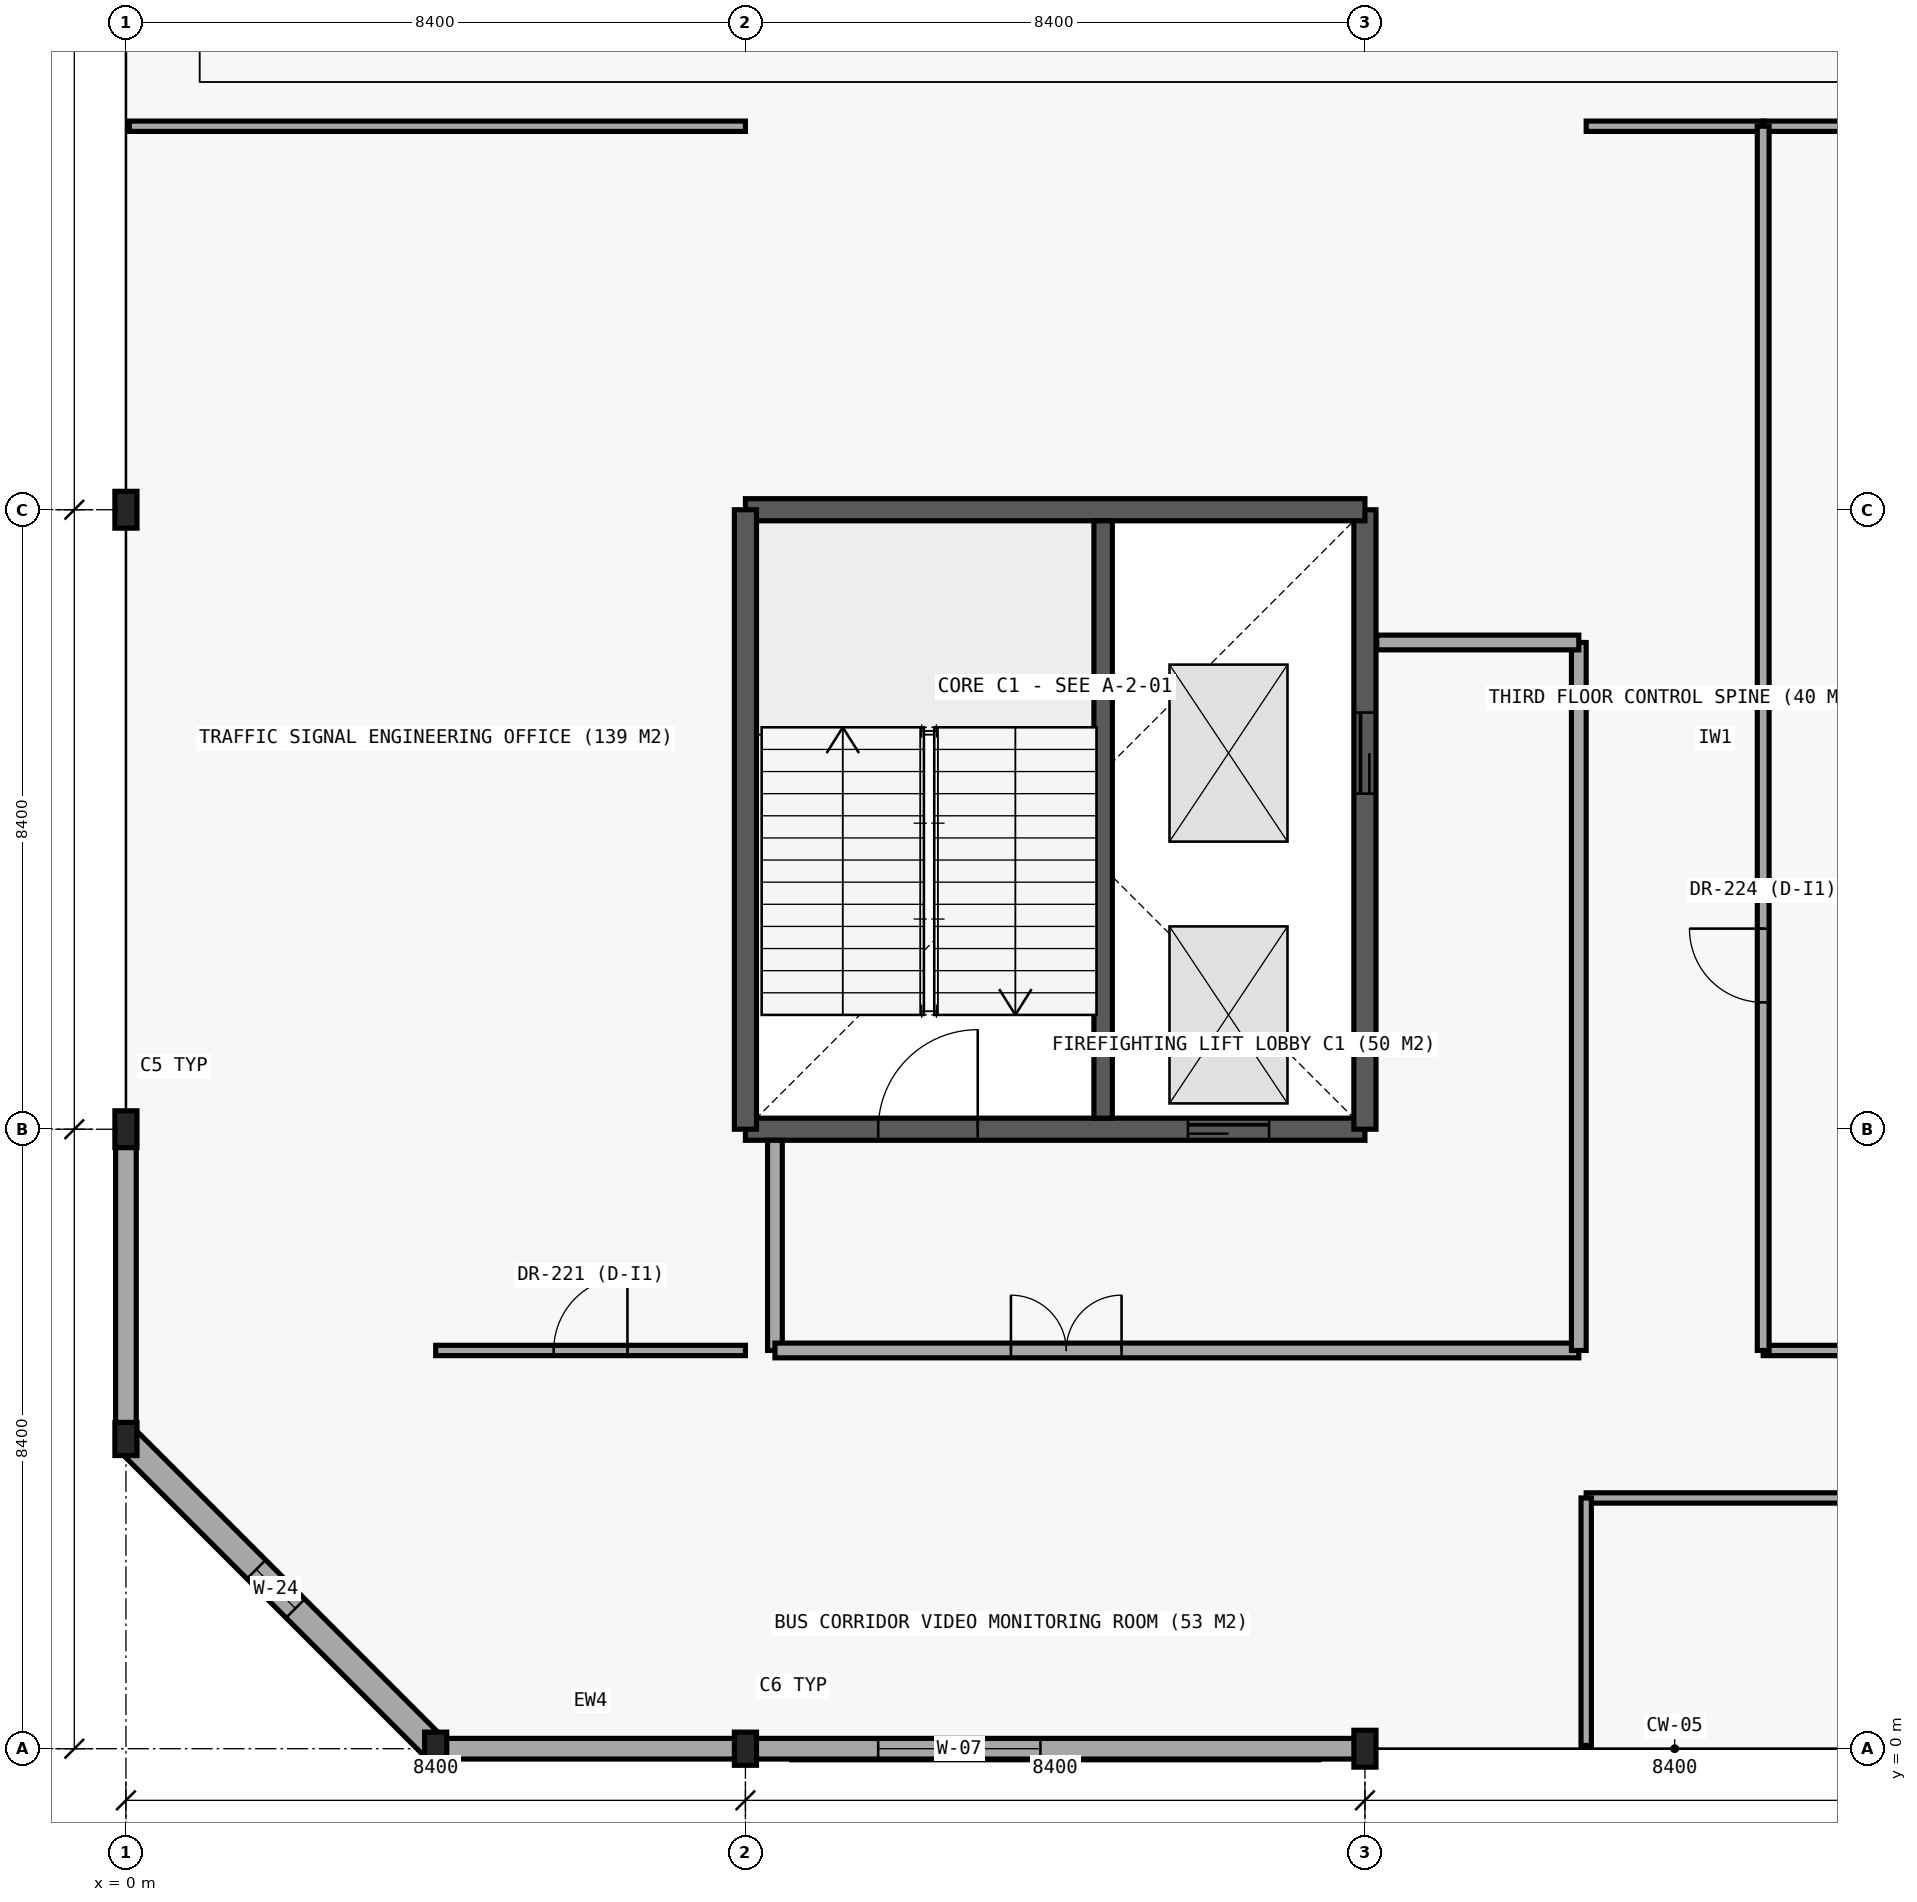
"""IFC4 building model, lengths in metres.
Left out: names, types, materials, properties, quantities, classifications, styles, units other than length and angle.
Written with IfcOpenShell. Run it as: python <this file> out.ifc"""

import sys

from ifc_helpers import new_model, si_unit, direction, frame, frame_2d, origin, origin_2d, place, context, subcontext, project, spatial, rectangle, i_section, extrude, element, fill, save


model = new_model("IFC4")
c1 = context("Model", 3, precision=1e-05, world=origin(), true_north=direction((0.0, 1.0)))
c2 = subcontext(c1, "Body", "Model", "MODEL_VIEW")
j1 = project(units=[si_unit("LENGTHUNIT", "METRE"), si_unit("PLANEANGLEUNIT", "RADIAN")], contexts=[c1])
p1 = place(None, origin())
s1 = spatial("IfcSite", under=j1, at=p1, CompositionType="ELEMENT")
p2 = place(p1, origin())
s2 = spatial("IfcBuilding", under=s1, at=p2, CompositionType="ELEMENT")
p3 = place(p2, frame((0.0, 0.0, 13.2)))
s3 = spatial("IfcBuildingStorey", under=s2, at=p3, CompositionType="ELEMENT", Elevation=13.2)
p4 = place(p3, frame((8.4, 8.4, 0.0), z_axis=(0.0, 0.0, 1.0), x_axis=(1.0, 0.0, 0.0)))
e1 = element("IfcWall", 1, at=p4, inside=s3, PredefinedType="SHEAR", context=c2, shape_type="SweptSolid", body=[
    extrude(rectangle(XDim=8.4, YDim=0.3, at=frame_2d((4.2, 0.0))), origin(), (0.0, 0.0, 1.0), 4.2),
])
p5 = place(p4, frame((1.8, 0.0, 0.0)))
e2 = element("IfcOpeningElement", 2, at=p5, cuts=e1, PredefinedType="OPENING", context=c2, shape_type="SweptSolid", body=[
    extrude(rectangle(XDim=1.35, YDim=2.2, at=frame_2d((0.675, 1.1))), frame((0.0, 0.16, 0.0), z_axis=(0.0, -1.0, 0.0), x_axis=(1.0, 0.0, 0.0)), (0.0, 0.0, 1.0), 0.32),
])
p6 = place(p4, frame((6.0, 0.0, 0.0)))
e3 = element("IfcOpeningElement", 3, at=p6, cuts=e1, PredefinedType="OPENING", context=c2, shape_type="SweptSolid", body=[
    extrude(rectangle(XDim=1.1, YDim=2.2, at=frame_2d((0.55, 1.1))), frame((0.0, 0.16, 0.0), z_axis=(0.0, -1.0, 0.0), x_axis=(1.0, 0.0, 0.0)), (0.0, 0.0, 1.0), 0.32),
])
p7 = place(p3, frame((16.8, 8.4, 0.0), z_axis=(0.0, 0.0, 1.0), x_axis=(0.0, 1.0, 0.0)))
e4 = element("IfcWall", 4, at=p7, inside=s3, PredefinedType="SHEAR", context=c2, shape_type="SweptSolid", body=[
    extrude(rectangle(XDim=8.4, YDim=0.3, at=frame_2d((4.2, 0.0))), origin(), (0.0, 0.0, 1.0), 4.2),
])
p8 = place(p7, frame((4.55, 0.0, 0.0)))
e5 = element("IfcOpeningElement", 5, at=p8, cuts=e4, PredefinedType="OPENING", context=c2, shape_type="SweptSolid", body=[
    extrude(rectangle(XDim=1.1, YDim=2.2, at=frame_2d((0.55, 1.1))), frame((0.0, 0.16, 0.0), z_axis=(0.0, -1.0, 0.0), x_axis=(1.0, 0.0, 0.0)), (0.0, 0.0, 1.0), 0.32),
])
for number, where, z_axis, x_axis in (
    (6, (16.8, 16.8, 0.0), (0.0, 0.0, 1.0), (-1.0, 0.0, 0.0)),
    (7, (8.4, 16.8, 0.0), (0.0, 0.0, 1.0), (0.0, -1.0, 0.0)),
):
    element("IfcWall", number, at=place(p3, frame(where, z_axis=z_axis, x_axis=x_axis)), inside=s3, PredefinedType="SHEAR", context=c2, shape_type="SweptSolid", body=[
        extrude(rectangle(XDim=8.4, YDim=0.3, at=frame_2d((4.2, 0.0))), origin(), (0.0, 0.0, 1.0), 4.2),
    ])
p9 = place(p3, frame((13.25, 8.55, 0.0), z_axis=(0.0, 0.0, 1.0), x_axis=(0.0, 1.0, 0.0)))
e8 = element("IfcWall", 8, at=p9, inside=s3, PredefinedType="SHEAR", context=c2, shape_type="SweptSolid", body=[
    extrude(rectangle(XDim=8.1, YDim=0.25, at=frame_2d((4.05, 0.0))), origin(), (0.0, 0.0, 1.0), 4.2),
])
for number, where, z_axis, x_axis in (
    (9, (0.0, 8.4, 0.0), (0.0, 0.0, 1.0), (1.0, 0.0, 0.0)),
    (10, (0.0, 16.8, 0.0), (0.0, 0.0, 1.0), (1.0, 0.0, 0.0)),
):
    element("IfcColumn", number, at=place(p3, frame(where, z_axis=z_axis, x_axis=x_axis)), inside=s3, PredefinedType="COLUMN", context=c2, shape_type="SweptSolid", body=[
        extrude(i_section(OverallWidth=0.3, OverallDepth=0.5, WebThickness=0.014, FlangeThickness=0.028, FilletRadius=0.027, at=origin_2d()), origin(), (0.0, 0.0, 1.0), 4.2),
    ])
p10 = place(p3, frame((8.4, 0.0, 0.0), z_axis=(0.0, 0.0, 1.0), x_axis=(1.0, 0.0, 0.0)))
e11 = element("IfcColumn", 11, at=p10, inside=s3, PredefinedType="COLUMN", context=c2, shape_type="SweptSolid", body=[
    extrude(i_section(OverallWidth=0.3, OverallDepth=0.45, WebThickness=0.014, FlangeThickness=0.026, FilletRadius=0.027, at=origin_2d()), origin(), (0.0, 0.0, 1.0), 4.2),
])
p11 = place(p3, frame((16.8, 0.0, 0.0), z_axis=(0.0, 0.0, 1.0), x_axis=(1.0, 0.0, 0.0)))
e12 = element("IfcColumn", 12, at=p11, inside=s3, PredefinedType="COLUMN", context=c2, shape_type="SweptSolid", body=[
    extrude(i_section(OverallWidth=0.3, OverallDepth=0.5, WebThickness=0.014, FlangeThickness=0.028, FilletRadius=0.027, at=origin_2d()), origin(), (0.0, 0.0, 1.0), 4.2),
])
for number, where, z_axis, x_axis in (
    (13, (4.2, 0.0, 0.0), (0.0, 0.0, 1.0), (1.0, 0.0, 0.0)),
    (14, (0.0, 4.2, 0.0), (0.0, 0.0, 1.0), (1.0, 0.0, 0.0)),
):
    element("IfcColumn", number, at=place(p3, frame(where, z_axis=z_axis, x_axis=x_axis)), inside=s3, PredefinedType="COLUMN", context=c2, shape_type="SweptSolid", body=[
        extrude(i_section(OverallWidth=0.3, OverallDepth=0.45, WebThickness=0.014, FlangeThickness=0.026, FilletRadius=0.027, at=origin_2d()), origin(), (0.0, 0.0, 1.0), 4.2),
    ])
p12 = place(p3, frame((4.2, 0.0, 0.0), z_axis=(0.0, 0.0, 1.0), x_axis=(1.0, 0.0, 0.0)))
e15 = element("IfcWall", 15, at=p12, inside=s3, PredefinedType="STANDARD", context=c2, shape_type="SweptSolid", body=[
    extrude(rectangle(XDim=4.2, YDim=0.28, at=frame_2d((2.1, 0.0))), origin(), (0.0, 0.0, 1.0), 3.62),
])
p13 = place(p3, frame((8.4, 0.0, 0.0), z_axis=(0.0, 0.0, 1.0), x_axis=(1.0, 0.0, 0.0)))
e16 = element("IfcWall", 16, at=p13, inside=s3, PredefinedType="STANDARD", context=c2, shape_type="SweptSolid", body=[
    extrude(rectangle(XDim=8.4, YDim=0.28, at=frame_2d((4.2, 0.0))), origin(), (0.0, 0.0, 1.0), 3.62),
])
p14 = place(p13, frame((1.8, 0.0, 0.85)))
e17 = element("IfcOpeningElement", 17, at=p14, cuts=e16, PredefinedType="OPENING", context=c2, shape_type="SweptSolid", body=[
    extrude(rectangle(XDim=2.2, YDim=2.5, at=frame_2d((1.1, 1.25))), frame((0.0, 0.15, 0.0), z_axis=(0.0, -1.0, 0.0), x_axis=(1.0, 0.0, 0.0)), (0.0, 0.0, 1.0), 0.3),
])
p15 = place(p3, frame((0.0, 8.4, 0.0), z_axis=(0.0, 0.0, 1.0), x_axis=(0.0, -1.0, 0.0)))
e18 = element("IfcWall", 18, at=p15, inside=s3, PredefinedType="STANDARD", context=c2, shape_type="SweptSolid", body=[
    extrude(rectangle(XDim=4.2, YDim=0.28, at=frame_2d((2.1, 0.0))), origin(), (0.0, 0.0, 1.0), 3.62),
])
p16 = place(p3, frame((0.0, 4.2, 0.0), z_axis=(0.0, 0.0, 1.0), x_axis=(0.707106781187, -0.707106781187, 0.0)))
e19 = element("IfcWall", 19, at=p16, inside=s3, PredefinedType="STANDARD", context=c2, shape_type="SweptSolid", body=[
    extrude(rectangle(XDim=5.94, YDim=0.36, at=frame_2d((2.97, 0.0))), origin(), (0.0, 0.0, 1.0), 3.62),
])
p17 = place(p16, frame((2.5, 0.0, 1.0)))
e20 = element("IfcOpeningElement", 20, at=p17, cuts=e19, PredefinedType="OPENING", context=c2, shape_type="SweptSolid", body=[
    extrude(rectangle(XDim=0.75, YDim=1.5, at=frame_2d((0.375, 0.75))), frame((0.0, 0.19, 0.0), z_axis=(0.0, -1.0, 0.0), x_axis=(1.0, 0.0, 0.0)), (0.0, 0.0, 1.0), 0.38),
])
p18 = place(p3, frame((8.8, 5.4, 0.0), z_axis=(0.0, 0.0, 1.0), x_axis=(0.0, 1.0, 0.0)))
e21 = element("IfcWall", 21, at=p18, inside=s3, PredefinedType="PARTITIONING", context=c2, shape_type="SweptSolid", body=[
    extrude(rectangle(XDim=2.85, YDim=0.2, at=frame_2d((1.425, 0.0))), origin(), (0.0, 0.0, 1.0), 3.52),
])
p19 = place(p3, frame((8.8, 5.4, 0.0), z_axis=(0.0, 0.0, 1.0), x_axis=(1.0, 0.0, 0.0)))
e22 = element("IfcWall", 22, at=p19, inside=s3, PredefinedType="PARTITIONING", context=c2, shape_type="SweptSolid", body=[
    extrude(rectangle(XDim=10.9, YDim=0.2, at=frame_2d((5.45, 0.0))), origin(), (0.0, 0.0, 1.0), 3.52),
])
p20 = place(p19, frame((3.2, 0.0, 0.0)))
e23 = element("IfcOpeningElement", 23, at=p20, cuts=e22, PredefinedType="OPENING", context=c2, shape_type="SweptSolid", body=[
    extrude(rectangle(XDim=1.5, YDim=2.2, at=frame_2d((0.75, 1.1))), frame((0.0, 0.11, 0.0), z_axis=(0.0, -1.0, 0.0), x_axis=(1.0, 0.0, 0.0)), (0.0, 0.0, 1.0), 0.22),
])
p21 = place(p3, frame((19.7, 5.4, 0.0), z_axis=(0.0, 0.0, 1.0), x_axis=(0.0, 1.0, 0.0)))
e24 = element("IfcWall", 24, at=p21, inside=s3, PredefinedType="PARTITIONING", context=c2, shape_type="SweptSolid", body=[
    extrude(rectangle(XDim=9.6, YDim=0.2, at=frame_2d((4.8, 0.0))), origin(), (0.0, 0.0, 1.0), 3.52),
])
p22 = place(p3, frame((16.96, 15.0, 0.0), z_axis=(0.0, 0.0, 1.0), x_axis=(1.0, 0.0, 0.0)))
e25 = element("IfcWall", 25, at=p22, inside=s3, PredefinedType="PARTITIONING", context=c2, shape_type="SweptSolid", body=[
    extrude(rectangle(XDim=2.74, YDim=0.2, at=frame_2d((1.37, 0.0))), origin(), (0.0, 0.0, 1.0), 3.52),
])
p23 = place(p3, frame((19.8, 3.4, 0.0), z_axis=(0.0, 0.0, 1.0), x_axis=(1.0, 0.0, 0.0)))
e26 = element("IfcWall", 26, at=p23, inside=s3, PredefinedType="PARTITIONING", context=c2, shape_type="SweptSolid", body=[
    extrude(rectangle(XDim=13.8, YDim=0.14, at=frame_2d((6.9, 0.0))), origin(), (0.0, 0.0, 1.0), 3.5),
])
p24 = place(p23, frame((6.4, 0.0, 0.0)))
e27 = element("IfcOpeningElement", 27, at=p24, cuts=e26, PredefinedType="OPENING", context=c2, shape_type="SweptSolid", body=[
    extrude(rectangle(XDim=1.0, YDim=2.15, at=frame_2d((0.5, 1.075))), frame((0.0, 0.08, 0.0), z_axis=(0.0, -1.0, 0.0), x_axis=(1.0, 0.0, 0.0)), (0.0, 0.0, 1.0), 0.16),
])
p25 = place(p3, frame((4.2, 5.4, 0.0), z_axis=(0.0, 0.0, 1.0), x_axis=(1.0, 0.0, 0.0)))
e28 = element("IfcWall", 28, at=p25, inside=s3, PredefinedType="PARTITIONING", context=c2, shape_type="SweptSolid", body=[
    extrude(rectangle(XDim=4.2, YDim=0.14, at=frame_2d((2.1, 0.0))), origin(), (0.0, 0.0, 1.0), 3.5),
])
p26 = place(p25, frame((1.6, 0.0, 0.0)))
e29 = element("IfcOpeningElement", 29, at=p26, cuts=e28, PredefinedType="OPENING", context=c2, shape_type="SweptSolid", body=[
    extrude(rectangle(XDim=1.0, YDim=2.15, at=frame_2d((0.5, 1.075))), frame((0.0, 0.08, 0.0), z_axis=(0.0, -1.0, 0.0), x_axis=(1.0, 0.0, 0.0)), (0.0, 0.0, 1.0), 0.16),
])
p27 = place(p3, frame((22.2, 5.4, 0.0), z_axis=(0.0, 0.0, 1.0), x_axis=(1.0, 0.0, 0.0)))
e30 = element("IfcWall", 30, at=p27, inside=s3, PredefinedType="PARTITIONING", context=c2, shape_type="SweptSolid", body=[
    extrude(rectangle(XDim=11.4, YDim=0.14, at=frame_2d((5.7, 0.0))), origin(), (0.0, 0.0, 1.0), 3.5),
])
p28 = place(p3, frame((0.045, 22.0, 0.0), z_axis=(0.0, 0.0, 1.0), x_axis=(1.0, 0.0, 0.0)))
e31 = element("IfcWall", 31, at=p28, inside=s3, PredefinedType="PARTITIONING", context=c2, shape_type="SweptSolid", body=[
    extrude(rectangle(XDim=8.355, YDim=0.14, at=frame_2d((4.177, 0.0))), origin(), (0.0, 0.0, 1.0), 3.5),
])
p29 = place(p3, frame((19.8, 22.0, 0.0), z_axis=(0.0, 0.0, 1.0), x_axis=(1.0, 0.0, 0.0)))
e32 = element("IfcWall", 32, at=p29, inside=s3, PredefinedType="PARTITIONING", context=c2, shape_type="SweptSolid", body=[
    extrude(rectangle(XDim=2.4, YDim=0.14, at=frame_2d((1.2, 0.0))), origin(), (0.0, 0.0, 1.0), 3.5),
])
p30 = place(p3, frame((22.2, 22.0, 0.0), z_axis=(0.0, 0.0, 1.0), x_axis=(1.0, 0.0, 0.0)))
e33 = element("IfcWall", 33, at=p30, inside=s3, PredefinedType="PARTITIONING", context=c2, shape_type="SweptSolid", body=[
    extrude(rectangle(XDim=8.8, YDim=0.14, at=frame_2d((4.4, 0.0))), origin(), (0.0, 0.0, 1.0), 3.5),
])
p31 = place(p30, frame((3.7, 0.0, 0.0)))
e34 = element("IfcOpeningElement", 34, at=p31, cuts=e33, PredefinedType="OPENING", context=c2, shape_type="SweptSolid", body=[
    extrude(rectangle(XDim=1.4, YDim=2.25, at=frame_2d((0.7, 1.125))), frame((0.0, 0.08, 0.0), z_axis=(0.0, -1.0, 0.0), x_axis=(1.0, 0.0, 0.0)), (0.0, 0.0, 1.0), 0.16),
])
p32 = place(p3, frame((19.8, 0.045, 0.0), z_axis=(0.0, 0.0, 1.0), x_axis=(0.0, 1.0, 0.0)))
e35 = element("IfcWall", 35, at=p32, inside=s3, PredefinedType="PARTITIONING", context=c2, shape_type="SweptSolid", body=[
    extrude(rectangle(XDim=3.355, YDim=0.14, at=frame_2d((1.677, 0.0))), origin(), (0.0, 0.0, 1.0), 3.5),
])
p33 = place(p3, frame((22.2, 5.4, 0.0), z_axis=(0.0, 0.0, 1.0), x_axis=(0.0, 1.0, 0.0)))
e36 = element("IfcWall", 36, at=p33, inside=s3, PredefinedType="PARTITIONING", context=c2, shape_type="SweptSolid", body=[
    extrude(rectangle(XDim=16.6, YDim=0.16, at=frame_2d((8.3, 0.0))), origin(), (0.0, 0.0, 1.0), 3.5),
])
p34 = place(p33, frame((4.72, 0.0, 0.0)))
e37 = element("IfcOpeningElement", 37, at=p34, cuts=e36, PredefinedType="OPENING", context=c2, shape_type="SweptSolid", body=[
    extrude(rectangle(XDim=1.0, YDim=2.15, at=frame_2d((0.5, 1.075))), frame((0.0, 0.09, 0.0), z_axis=(0.0, -1.0, 0.0), x_axis=(1.0, 0.0, 0.0)), (0.0, 0.0, 1.0), 0.18),
])
p35 = place(p14, origin())
e38 = element("IfcWindow", 38, at=p35, inside=s3, PartitioningType="SINGLE_PANEL", PredefinedType="WINDOW", context=c2, shape_type="SweptSolid", body=[
    extrude(rectangle(XDim=2.2, YDim=2.5, at=frame_2d((1.1, 1.25))), frame((0.0, 0.03, 0.0), z_axis=(0.0, -1.0, 0.0), x_axis=(1.0, 0.0, 0.0)), (0.0, 0.0, 1.0), 0.06),
])
fill(e17, e38)
p36 = place(p17, origin())
e39 = element("IfcWindow", 39, at=p36, inside=s3, PartitioningType="SINGLE_PANEL", PredefinedType="WINDOW", context=c2, shape_type="SweptSolid", body=[
    extrude(rectangle(XDim=0.75, YDim=1.5, at=frame_2d((0.375, 0.75))), frame((0.0, 0.03, 0.0), z_axis=(0.0, -1.0, 0.0), x_axis=(1.0, 0.0, 0.0)), (0.0, 0.0, 1.0), 0.06),
])
fill(e20, e39)
p37 = place(p5, origin())
e40 = element("IfcDoor", 40, at=p37, inside=s3, OperationType="SINGLE_SWING_RIGHT", PredefinedType="DOOR", context=c2, shape_type="SweptSolid", body=[
    extrude(rectangle(XDim=1.35, YDim=2.2, at=frame_2d((0.675, 1.1))), frame((0.0, 0.025, 0.0), z_axis=(0.0, -1.0, 0.0), x_axis=(1.0, 0.0, 0.0)), (0.0, 0.0, 1.0), 0.05),
])
fill(e2, e40)
p38 = place(p6, origin())
e41 = element("IfcDoor", 41, at=p38, inside=s3, OperationType="SLIDING_TO_LEFT", PredefinedType="DOOR", context=c2, shape_type="SweptSolid", body=[
    extrude(rectangle(XDim=1.1, YDim=2.2, at=frame_2d((0.55, 1.1))), frame((0.0, 0.025, 0.0), z_axis=(0.0, -1.0, 0.0), x_axis=(1.0, 0.0, 0.0)), (0.0, 0.0, 1.0), 0.05),
])
fill(e3, e41)
p39 = place(p8, origin())
e42 = element("IfcDoor", 42, at=p39, inside=s3, OperationType="SLIDING_TO_RIGHT", PredefinedType="DOOR", context=c2, shape_type="SweptSolid", body=[
    extrude(rectangle(XDim=1.1, YDim=2.2, at=frame_2d((0.55, 1.1))), frame((0.0, 0.025, 0.0), z_axis=(0.0, -1.0, 0.0), x_axis=(1.0, 0.0, 0.0)), (0.0, 0.0, 1.0), 0.05),
])
fill(e5, e42)
p40 = place(p20, origin())
e43 = element("IfcDoor", 43, at=p40, inside=s3, OperationType="DOUBLE_DOOR_SINGLE_SWING", PredefinedType="DOOR", context=c2, shape_type="SweptSolid", body=[
    extrude(rectangle(XDim=1.5, YDim=2.2, at=frame_2d((0.75, 1.1))), frame((0.0, 0.025, 0.0), z_axis=(0.0, -1.0, 0.0), x_axis=(1.0, 0.0, 0.0)), (0.0, 0.0, 1.0), 0.05),
])
fill(e23, e43)
p41 = place(p26, origin())
e44 = element("IfcDoor", 44, at=p41, inside=s3, OperationType="SINGLE_SWING_RIGHT", PredefinedType="DOOR", context=c2, shape_type="SweptSolid", body=[
    extrude(rectangle(XDim=1.0, YDim=2.15, at=frame_2d((0.5, 1.075))), frame((0.0, 0.025, 0.0), z_axis=(0.0, -1.0, 0.0), x_axis=(1.0, 0.0, 0.0)), (0.0, 0.0, 1.0), 0.05),
])
fill(e29, e44)
p42 = place(p34, origin())
e45 = element("IfcDoor", 45, at=p42, inside=s3, OperationType="SINGLE_SWING_RIGHT", PredefinedType="DOOR", context=c2, shape_type="SweptSolid", body=[
    extrude(rectangle(XDim=1.0, YDim=2.15, at=frame_2d((0.5, 1.075))), frame((0.0, 0.025, 0.0), z_axis=(0.0, -1.0, 0.0), x_axis=(1.0, 0.0, 0.0)), (0.0, 0.0, 1.0), 0.05),
])
fill(e37, e45)
save(model, sys.argv[1])
